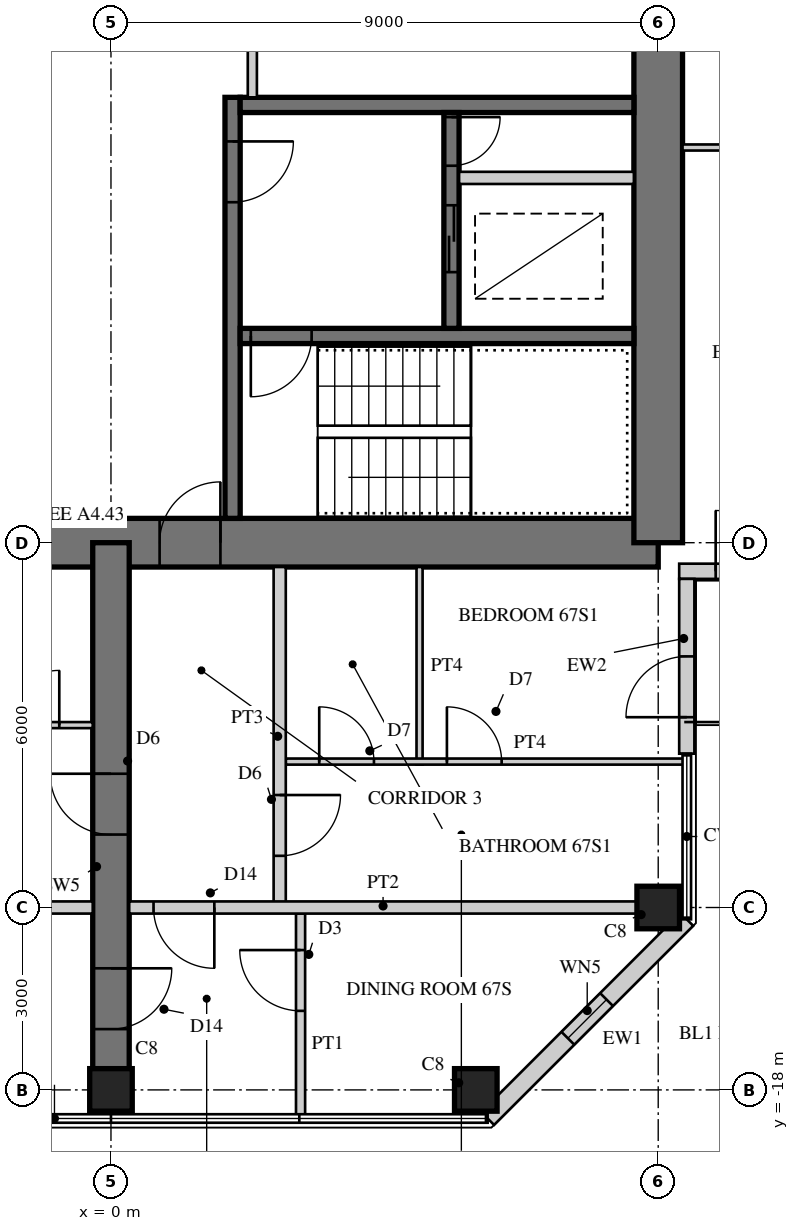
"""IFC4 building model, lengths in metres.
Left out: names, types, materials, properties, quantities, classifications, styles, units other than length and angle.
Written with IfcOpenShell. Run it as: python <this file> out.ifc"""

import sys

from ifc_helpers import new_model, si_unit, direction, frame, frame_2d, origin, origin_2d, place, context, subcontext, project, spatial, rectangle, hollow_rectangle, extrude, element, fill, save


model = new_model("IFC4")
c1 = context("Model", 3, precision=1e-05, world=origin(), true_north=direction((0.0, 1.0)))
c2 = subcontext(c1, "Body", "Model", "MODEL_VIEW")
j1 = project(units=[si_unit("LENGTHUNIT", "METRE"), si_unit("PLANEANGLEUNIT", "RADIAN")], contexts=[c1])
p1 = place(None, origin())
s1 = spatial("IfcSite", under=j1, at=p1, CompositionType="ELEMENT")
p2 = place(p1, origin())
s2 = spatial("IfcBuilding", under=s1, at=p2, CompositionType="ELEMENT")
p3 = place(p2, frame((0.0, 0.0, 261.1)))
s3 = spatial("IfcBuildingStorey", under=s2, at=p3, CompositionType="ELEMENT", Elevation=261.1)
p4 = place(p3, frame((-9.0, -9.0, 0.0), z_axis=(0.0, 0.0, 1.0), x_axis=(1.0, 0.0, 0.0)))
e1 = element("IfcWall", 1, at=p4, inside=s3, PredefinedType="SHEAR", context=c2, shape_type="SweptSolid", body=[
    extrude(rectangle(XDim=18.0, YDim=0.8, at=frame_2d((9.0, 0.0))), origin(), (0.0, 0.0, 1.0), 3.4),
])
p5 = place(p4, frame((9.8, 0.0, 0.0)))
e2 = element("IfcOpeningElement", 2, at=p5, cuts=e1, PredefinedType="OPENING", context=c2, shape_type="SweptSolid", body=[
    extrude(rectangle(XDim=1.0, YDim=2.4, at=frame_2d((0.5, 1.2))), frame((0.0, 0.41, 0.0), z_axis=(0.0, -1.0, 0.0), x_axis=(1.0, 0.0, 0.0)), (0.0, 0.0, 1.0), 0.82),
])
p6 = place(p3, frame((9.0, -9.0, 0.0), z_axis=(0.0, 0.0, 1.0), x_axis=(0.0, 1.0, 0.0)))
e3 = element("IfcWall", 3, at=p6, inside=s3, PredefinedType="SHEAR", context=c2, shape_type="SweptSolid", body=[
    extrude(rectangle(XDim=18.0, YDim=0.8, at=frame_2d((9.0, 0.0))), origin(), (0.0, 0.0, 1.0), 3.4),
])
p7 = place(p6, frame((9.8, 0.0, 0.0)))
e4 = element("IfcOpeningElement", 4, at=p7, cuts=e3, PredefinedType="OPENING", context=c2, shape_type="SweptSolid", body=[
    extrude(rectangle(XDim=1.0, YDim=2.4, at=frame_2d((0.5, 1.2))), frame((0.0, 0.41, 0.0), z_axis=(0.0, -1.0, 0.0), x_axis=(1.0, 0.0, 0.0)), (0.0, 0.0, 1.0), 0.82),
])
p8 = place(p3, frame((2.0, -1.675, 0.0), z_axis=(0.0, 0.0, 1.0), x_axis=(0.0, -1.0, 0.0)))
e5 = element("IfcWall", 5, at=p8, inside=s3, PredefinedType="SHEAR", context=c2, shape_type="SweptSolid", body=[
    extrude(rectangle(XDim=6.925, YDim=0.25, at=frame_2d((3.462, 0.0))), origin(), (0.0, 0.0, 1.0), 3.4),
])
p9 = place(p8, frame((0.725, 0.0, 0.0)))
e6 = element("IfcOpeningElement", 6, at=p9, cuts=e5, PredefinedType="OPENING", context=c2, shape_type="SweptSolid", body=[
    extrude(rectangle(XDim=1.0, YDim=2.1, at=frame_2d((0.5, 1.05))), frame((0.0, 0.135, 0.0), z_axis=(0.0, -1.0, 0.0), x_axis=(1.0, 0.0, 0.0)), (0.0, 0.0, 1.0), 0.27),
])
p10 = place(p3, frame((2.125, -1.8, 0.0), z_axis=(0.0, 0.0, 1.0), x_axis=(1.0, 0.0, 0.0)))
e7 = element("IfcWall", 7, at=p10, inside=s3, PredefinedType="SHEAR", context=c2, shape_type="SweptSolid", body=[
    extrude(rectangle(XDim=6.475, YDim=0.25, at=frame_2d((3.238, 0.0))), origin(), (0.0, 0.0, 1.0), 3.4),
])
p11 = place(p3, frame((2.125, -5.6, 0.0), z_axis=(0.0, 0.0, 1.0), x_axis=(1.0, 0.0, 0.0)))
e8 = element("IfcWall", 8, at=p11, inside=s3, PredefinedType="SHEAR", context=c2, shape_type="SweptSolid", body=[
    extrude(rectangle(XDim=6.475, YDim=0.25, at=frame_2d((3.238, 0.0))), origin(), (0.0, 0.0, 1.0), 3.4),
])
p12 = place(p11, frame((0.175, 0.0, 0.0)))
e9 = element("IfcOpeningElement", 9, at=p12, cuts=e8, PredefinedType="OPENING", context=c2, shape_type="SweptSolid", body=[
    extrude(rectangle(XDim=1.0, YDim=2.1, at=frame_2d((0.5, 1.05))), frame((0.0, 0.135, 0.0), z_axis=(0.0, -1.0, 0.0), x_axis=(1.0, 0.0, 0.0)), (0.0, 0.0, 1.0), 0.27),
])
p13 = place(p3, frame((5.6, -1.925, 0.0), z_axis=(0.0, 0.0, 1.0), x_axis=(0.0, -1.0, 0.0)))
e10 = element("IfcWall", 10, at=p13, inside=s3, PredefinedType="SHEAR", context=c2, shape_type="SweptSolid", body=[
    extrude(rectangle(XDim=3.55, YDim=0.25, at=frame_2d((1.775, 0.0))), origin(), (0.0, 0.0, 1.0), 3.4),
])
p14 = place(p13, frame((1.525, 0.0, 0.0)))
e11 = element("IfcOpeningElement", 11, at=p14, cuts=e10, PredefinedType="OPENING", context=c2, shape_type="SweptSolid", body=[
    extrude(rectangle(XDim=1.1, YDim=2.2, at=frame_2d((0.55, 1.1))), frame((0.0, 0.135, 0.0), z_axis=(0.0, -1.0, 0.0), x_axis=(1.0, 0.0, 0.0)), (0.0, 0.0, 1.0), 0.27),
])
p15 = place(p13, frame((0.075, 0.0, 0.0)))
e12 = element("IfcOpeningElement", 12, at=p15, cuts=e10, PredefinedType="OPENING", context=c2, shape_type="SweptSolid", body=[
    extrude(rectangle(XDim=0.8, YDim=2.1, at=frame_2d((0.4, 1.05))), frame((0.0, 0.135, 0.0), z_axis=(0.0, -1.0, 0.0), x_axis=(1.0, 0.0, 0.0)), (0.0, 0.0, 1.0), 0.27),
])
p16 = place(p3, frame((5.725, -3.0, 0.0), z_axis=(0.0, 0.0, 1.0), x_axis=(1.0, 0.0, 0.0)))
e13 = element("IfcWall", 13, at=p16, inside=s3, PredefinedType="PARTITIONING", context=c2, shape_type="SweptSolid", body=[
    extrude(rectangle(XDim=2.875, YDim=0.2, at=frame_2d((1.438, 0.0))), origin(), (0.0, 0.0, 1.0), 3.4),
])
p17 = place(p3, frame((0.0, -9.0, 0.0), z_axis=(0.0, 0.0, 1.0), x_axis=(0.0, -1.0, 0.0)))
e14 = element("IfcWall", 14, at=p17, inside=s3, PredefinedType="SHEAR", context=c2, shape_type="SweptSolid", body=[
    extrude(rectangle(XDim=9.0, YDim=0.6, at=frame_2d((4.5, 0.0))), origin(), (0.0, 0.0, 1.0), 3.4),
])
p18 = place(p17, frame((3.8, 0.0, 0.0)))
e15 = element("IfcOpeningElement", 15, at=p18, cuts=e14, PredefinedType="OPENING", context=c2, shape_type="SweptSolid", body=[
    extrude(rectangle(XDim=1.0, YDim=2.15, at=frame_2d((0.5, 1.075))), frame((0.0, 0.31, 0.0), z_axis=(0.0, -1.0, 0.0), x_axis=(1.0, 0.0, 0.0)), (0.0, 0.0, 1.0), 0.62),
])
p19 = place(p17, frame((7.0, 0.0, 0.0)))
e16 = element("IfcOpeningElement", 16, at=p19, cuts=e14, PredefinedType="OPENING", context=c2, shape_type="SweptSolid", body=[
    extrude(rectangle(XDim=1.0, YDim=2.2, at=frame_2d((0.5, 1.1))), frame((0.0, 0.31, 0.0), z_axis=(0.0, -1.0, 0.0), x_axis=(1.0, 0.0, 0.0)), (0.0, 0.0, 1.0), 0.62),
])
for number, where, z_axis, x_axis in (
    (17, (9.0, -15.0, 0.0), (0.0, 0.0, 1.0), (1.0, 0.0, 0.0)),
    (18, (0.0, -18.0, 0.0), (0.0, 0.0, 1.0), (1.0, 0.0, 0.0)),
    (19, (6.0, -18.0, 0.0), (0.0, 0.0, 1.0), (1.0, 0.0, 0.0)),
):
    element("IfcColumn", number, at=place(p3, frame(where, z_axis=z_axis, x_axis=x_axis)), inside=s3, PredefinedType="COLUMN", context=c2, shape_type="SweptSolid", body=[
        extrude(rectangle(XDim=0.7, YDim=0.7, at=origin_2d()), origin(), (0.0, 0.0, 1.0), 3.4),
    ])
p20 = place(p3, frame((9.345, -9.47, 0.0), z_axis=(0.0, 0.0, 1.0), x_axis=(1.0, 0.0, 0.0)))
e20 = element("IfcWall", 20, at=p20, inside=s3, PredefinedType="SOLIDWALL", context=c2, shape_type="SweptSolid", body=[
    extrude(rectangle(XDim=3.125, YDim=0.25, at=frame_2d((1.562, 0.0))), origin(), (0.0, 0.0, 1.0), 3.22),
])
p21 = place(p20, frame((0.6, 0.0, 0.0)))
e21 = element("IfcOpeningElement", 21, at=p21, cuts=e20, PredefinedType="OPENING", context=c2, shape_type="SweptSolid", body=[
    extrude(rectangle(XDim=1.0, YDim=2.2, at=frame_2d((0.5, 1.1))), frame((0.0, 0.135, 0.0), z_axis=(0.0, -1.0, 0.0), x_axis=(1.0, 0.0, 0.0)), (0.0, 0.0, 1.0), 0.27),
])
p22 = place(p3, frame((6.195, -18.47, 0.0), z_axis=(0.0, 0.0, 1.0), x_axis=(0.707106781187, 0.707106781187, 0.0)))
e22 = element("IfcWall", 22, at=p22, inside=s3, PredefinedType="SOLIDWALL", context=c2, shape_type="SweptSolid", body=[
    extrude(rectangle(XDim=4.632, YDim=0.3, at=frame_2d((2.316, 0.0))), origin(), (0.0, 0.0, 1.0), 3.22),
])
p23 = place(p22, frame((1.866, 0.0, 0.3)))
e23 = element("IfcOpeningElement", 23, at=p23, cuts=e22, PredefinedType="OPENING", context=c2, shape_type="SweptSolid", body=[
    extrude(rectangle(XDim=0.9, YDim=2.4, at=frame_2d((0.45, 1.2))), frame((0.0, 0.16, 0.0), z_axis=(0.0, -1.0, 0.0), x_axis=(1.0, 0.0, 0.0)), (0.0, 0.0, 1.0), 0.32),
])
p24 = place(p3, frame((9.47, -12.47, 0.0), z_axis=(0.0, 0.0, 1.0), x_axis=(0.0, 1.0, 0.0)))
e24 = element("IfcWall", 24, at=p24, inside=s3, PredefinedType="SOLIDWALL", context=c2, shape_type="SweptSolid", body=[
    extrude(rectangle(XDim=2.875, YDim=0.25, at=frame_2d((1.438, 0.0))), origin(), (0.0, 0.0, 1.0), 3.22),
])
p25 = place(p24, frame((0.6, 0.0, 0.0)))
e25 = element("IfcOpeningElement", 25, at=p25, cuts=e24, PredefinedType="OPENING", context=c2, shape_type="SweptSolid", body=[
    extrude(rectangle(XDim=1.0, YDim=2.2, at=frame_2d((0.5, 1.1))), frame((0.0, 0.135, 0.0), z_axis=(0.0, -1.0, 0.0), x_axis=(1.0, 0.0, 0.0)), (0.0, 0.0, 1.0), 0.27),
])
p26 = place(p3, frame((2.325, -1.675, 0.0), z_axis=(0.0, 0.0, 1.0), x_axis=(0.0, 1.0, 0.0)))
e26 = element("IfcWall", 26, at=p26, inside=s3, PredefinedType="PARTITIONING", context=c2, shape_type="SweptSolid", body=[
    extrude(rectangle(XDim=1.95, YDim=0.15, at=frame_2d((0.975, 0.0))), origin(), (0.0, 0.0, 1.0), 3.22),
])
p27 = place(p3, frame((9.4, -2.5, 0.0), z_axis=(0.0, 0.0, 1.0), x_axis=(1.0, 0.0, 0.0)))
e27 = element("IfcWall", 27, at=p27, inside=s3, PredefinedType="PARTITIONING", context=c2, shape_type="SweptSolid", body=[
    extrude(rectangle(XDim=2.65, YDim=0.1, at=frame_2d((1.325, 0.0))), origin(), (0.0, 0.0, 1.0), 3.22),
])
p28 = place(p3, frame((5.075, -9.4, 0.0), z_axis=(0.0, 0.0, 1.0), x_axis=(0.0, -1.0, 0.0)))
e28 = element("IfcWall", 28, at=p28, inside=s3, PredefinedType="PARTITIONING", context=c2, shape_type="SweptSolid", body=[
    extrude(rectangle(XDim=3.25, YDim=0.1, at=frame_2d((1.625, 0.0))), origin(), (0.0, 0.0, 1.0), 3.22),
])
p29 = place(p3, frame((2.875, -12.6, 0.0), z_axis=(0.0, 0.0, 1.0), x_axis=(1.0, 0.0, 0.0)))
e29 = element("IfcWall", 29, at=p29, inside=s3, PredefinedType="PARTITIONING", context=c2, shape_type="SweptSolid", body=[
    extrude(rectangle(XDim=6.555, YDim=0.1, at=frame_2d((3.277, 0.0))), origin(), (0.0, 0.0, 1.0), 3.22),
])
p30 = place(p29, frame((0.55, 0.0, 0.0)))
e30 = element("IfcOpeningElement", 30, at=p30, cuts=e29, PredefinedType="OPENING", context=c2, shape_type="SweptSolid", body=[
    extrude(rectangle(XDim=0.9, YDim=2.1, at=frame_2d((0.45, 1.05))), frame((0.0, 0.06, 0.0), z_axis=(0.0, -1.0, 0.0), x_axis=(1.0, 0.0, 0.0)), (0.0, 0.0, 1.0), 0.12),
])
p31 = place(p29, frame((2.65, 0.0, 0.0)))
e31 = element("IfcOpeningElement", 31, at=p31, cuts=e29, PredefinedType="OPENING", context=c2, shape_type="SweptSolid", body=[
    extrude(rectangle(XDim=0.9, YDim=2.1, at=frame_2d((0.45, 1.05))), frame((0.0, 0.06, 0.0), z_axis=(0.0, -1.0, 0.0), x_axis=(1.0, 0.0, 0.0)), (0.0, 0.0, 1.0), 0.12),
])
p32 = place(p3, frame((-9.345, -12.0, 0.0), z_axis=(0.0, 0.0, 1.0), x_axis=(1.0, 0.0, 0.0)))
e32 = element("IfcWall", 32, at=p32, inside=s3, PredefinedType="PARTITIONING", context=c2, shape_type="SweptSolid", body=[
    extrude(rectangle(XDim=9.045, YDim=0.1, at=frame_2d((4.522, 0.0))), origin(), (0.0, 0.0, 1.0), 3.22),
])
p33 = place(p32, frame((5.495, 0.0, 0.0)))
e33 = element("IfcOpeningElement", 33, at=p33, cuts=e32, PredefinedType="OPENING", context=c2, shape_type="SweptSolid", body=[
    extrude(rectangle(XDim=0.9, YDim=2.1, at=frame_2d((0.45, 1.05))), frame((0.0, 0.06, 0.0), z_axis=(0.0, -1.0, 0.0), x_axis=(1.0, 0.0, 0.0)), (0.0, 0.0, 1.0), 0.12),
])
p34 = place(p32, frame((7.595, 0.0, 0.0)))
e34 = element("IfcOpeningElement", 34, at=p34, cuts=e32, PredefinedType="OPENING", context=c2, shape_type="SweptSolid", body=[
    extrude(rectangle(XDim=0.9, YDim=2.1, at=frame_2d((0.45, 1.05))), frame((0.0, 0.06, 0.0), z_axis=(0.0, -1.0, 0.0), x_axis=(1.0, 0.0, 0.0)), (0.0, 0.0, 1.0), 0.12),
])
p35 = place(p3, frame((2.775, -9.4, 0.0), z_axis=(0.0, 0.0, 1.0), x_axis=(0.0, -1.0, 0.0)))
e35 = element("IfcWall", 35, at=p35, inside=s3, PredefinedType="SOLIDWALL", context=c2, shape_type="SweptSolid", body=[
    extrude(rectangle(XDim=5.6, YDim=0.2, at=frame_2d((2.8, 0.0))), origin(), (0.0, 0.0, 1.0), 3.22),
])
p36 = place(p35, frame((3.75, 0.0, 0.0)))
e36 = element("IfcOpeningElement", 36, at=p36, cuts=e35, PredefinedType="OPENING", context=c2, shape_type="SweptSolid", body=[
    extrude(rectangle(XDim=1.0, YDim=2.15, at=frame_2d((0.5, 1.075))), frame((0.0, 0.11, 0.0), z_axis=(0.0, -1.0, 0.0), x_axis=(1.0, 0.0, 0.0)), (0.0, 0.0, 1.0), 0.22),
])
p37 = place(p3, frame((3.118, -15.1, 0.0), z_axis=(0.0, 0.0, 1.0), x_axis=(0.0, -1.0, 0.0)))
e37 = element("IfcWall", 37, at=p37, inside=s3, PredefinedType="PARTITIONING", context=c2, shape_type="SweptSolid", body=[
    extrude(rectangle(XDim=3.33, YDim=0.15, at=frame_2d((1.665, 0.0))), origin(), (0.0, 0.0, 1.0), 3.22),
])
p38 = place(p37, frame((0.6, 0.0, 0.0)))
e38 = element("IfcOpeningElement", 38, at=p38, cuts=e37, PredefinedType="OPENING", context=c2, shape_type="SweptSolid", body=[
    extrude(rectangle(XDim=1.0, YDim=2.1, at=frame_2d((0.5, 1.05))), frame((0.0, 0.085, 0.0), z_axis=(0.0, -1.0, 0.0), x_axis=(1.0, 0.0, 0.0)), (0.0, 0.0, 1.0), 0.17),
])
p39 = place(p3, frame((-8.65, -15.0, 0.0), z_axis=(0.0, 0.0, 1.0), x_axis=(1.0, 0.0, 0.0)))
e39 = element("IfcWall", 39, at=p39, inside=s3, PredefinedType="SOLIDWALL", context=c2, shape_type="SweptSolid", body=[
    extrude(rectangle(XDim=8.35, YDim=0.2, at=frame_2d((4.175, 0.0))), origin(), (0.0, 0.0, 1.0), 2.52),
])
p40 = place(p3, frame((0.3, -15.0, 0.0), z_axis=(0.0, 0.0, 1.0), x_axis=(1.0, 0.0, 0.0)))
e40 = element("IfcWall", 40, at=p40, inside=s3, PredefinedType="SOLIDWALL", context=c2, shape_type="SweptSolid", body=[
    extrude(rectangle(XDim=8.35, YDim=0.2, at=frame_2d((4.175, 0.0))), origin(), (0.0, 0.0, 1.0), 2.52),
])
p41 = place(p40, frame((0.4, 0.0, 0.0)))
e41 = element("IfcOpeningElement", 41, at=p41, cuts=e40, PredefinedType="OPENING", context=c2, shape_type="SweptSolid", body=[
    extrude(rectangle(XDim=1.0, YDim=2.2, at=frame_2d((0.5, 1.1))), frame((0.0, 0.11, 0.0), z_axis=(0.0, -1.0, 0.0), x_axis=(1.0, 0.0, 0.0)), (0.0, 0.0, 1.0), 0.22),
])
p42 = place(p21, origin())
e42 = element("IfcDoor", 42, at=p42, inside=s3, OperationType="SINGLE_SWING_LEFT", PredefinedType="DOOR", context=c2, shape_type="SweptSolid", body=[
    extrude(hollow_rectangle(XDim=1.0, YDim=2.2, WallThickness=0.06, at=frame_2d((0.5, 1.1))), frame((0.0, 0.025, 0.0), z_axis=(0.0, -1.0, 0.0), x_axis=(1.0, 0.0, 0.0)), (0.0, 0.0, 1.0), 0.05),
    extrude(rectangle(XDim=0.879, YDim=2.079, at=frame_2d((0.5, 1.1))), frame((0.0, 0.025, 0.0), z_axis=(0.0, -1.0, 0.0), x_axis=(1.0, 0.0, 0.0)), (0.0, 0.0, 1.0), 0.05),
])
fill(e21, e42)
p43 = place(p23, origin())
e43 = element("IfcWindow", 43, at=p43, inside=s3, PartitioningType="SINGLE_PANEL", PredefinedType="WINDOW", context=c2, shape_type="SweptSolid", body=[
    extrude(hollow_rectangle(XDim=0.9, YDim=2.4, WallThickness=0.06, at=frame_2d((0.45, 1.2))), frame((0.0, 0.03, 0.0), z_axis=(0.0, -1.0, 0.0), x_axis=(1.0, 0.0, 0.0)), (0.0, 0.0, 1.0), 0.06),
    extrude(rectangle(XDim=0.779, YDim=2.279, at=frame_2d((0.45, 1.2))), frame((0.0, 0.03, 0.0), z_axis=(0.0, -1.0, 0.0), x_axis=(1.0, 0.0, 0.0)), (0.0, 0.0, 1.0), 0.06),
])
fill(e23, e43)
p44 = place(p25, origin())
e44 = element("IfcDoor", 44, at=p44, inside=s3, OperationType="SINGLE_SWING_LEFT", PredefinedType="DOOR", context=c2, shape_type="SweptSolid", body=[
    extrude(hollow_rectangle(XDim=1.0, YDim=2.2, WallThickness=0.06, at=frame_2d((0.5, 1.1))), frame((0.0, 0.025, 0.0), z_axis=(0.0, -1.0, 0.0), x_axis=(1.0, 0.0, 0.0)), (0.0, 0.0, 1.0), 0.05),
    extrude(rectangle(XDim=0.879, YDim=2.079, at=frame_2d((0.5, 1.1))), frame((0.0, 0.025, 0.0), z_axis=(0.0, -1.0, 0.0), x_axis=(1.0, 0.0, 0.0)), (0.0, 0.0, 1.0), 0.05),
])
fill(e25, e44)
p45 = place(p30, origin())
e45 = element("IfcDoor", 45, at=p45, inside=s3, OperationType="SINGLE_SWING_LEFT", PredefinedType="DOOR", context=c2, shape_type="SweptSolid", body=[
    extrude(rectangle(XDim=0.9, YDim=2.1, at=frame_2d((0.45, 1.05))), frame((0.0, 0.025, 0.0), z_axis=(0.0, -1.0, 0.0), x_axis=(1.0, 0.0, 0.0)), (0.0, 0.0, 1.0), 0.05),
])
fill(e30, e45)
p46 = place(p31, origin())
e46 = element("IfcDoor", 46, at=p46, inside=s3, OperationType="SINGLE_SWING_LEFT", PredefinedType="DOOR", context=c2, shape_type="SweptSolid", body=[
    extrude(rectangle(XDim=0.9, YDim=2.1, at=frame_2d((0.45, 1.05))), frame((0.0, 0.025, 0.0), z_axis=(0.0, -1.0, 0.0), x_axis=(1.0, 0.0, 0.0)), (0.0, 0.0, 1.0), 0.05),
])
fill(e31, e46)
p47 = place(p34, origin())
e47 = element("IfcDoor", 47, at=p47, inside=s3, OperationType="SINGLE_SWING_RIGHT", PredefinedType="DOOR", context=c2, shape_type="SweptSolid", body=[
    extrude(rectangle(XDim=0.9, YDim=2.1, at=frame_2d((0.45, 1.05))), frame((0.0, 0.025, 0.0), z_axis=(0.0, -1.0, 0.0), x_axis=(1.0, 0.0, 0.0)), (0.0, 0.0, 1.0), 0.05),
])
fill(e34, e47)
p48 = place(p36, origin())
e48 = element("IfcDoor", 48, at=p48, inside=s3, OperationType="SINGLE_SWING_LEFT", PredefinedType="DOOR", context=c2, shape_type="SweptSolid", body=[
    extrude(rectangle(XDim=1.0, YDim=2.15, at=frame_2d((0.5, 1.075))), frame((0.0, 0.025, 0.0), z_axis=(0.0, -1.0, 0.0), x_axis=(1.0, 0.0, 0.0)), (0.0, 0.0, 1.0), 0.05),
])
fill(e36, e48)
p49 = place(p38, frame((1.0, 0.0, 0.0), z_axis=(0.0, 0.0, 1.0), x_axis=(-1.0, 0.0, 0.0)))
e49 = element("IfcDoor", 49, at=p49, inside=s3, OperationType="SINGLE_SWING_RIGHT", PredefinedType="DOOR", context=c2, shape_type="SweptSolid", body=[
    extrude(rectangle(XDim=1.0, YDim=2.1, at=frame_2d((0.5, 1.05))), frame((0.0, 0.025, 0.0), z_axis=(0.0, -1.0, 0.0), x_axis=(1.0, 0.0, 0.0)), (0.0, 0.0, 1.0), 0.05),
])
fill(e38, e49)
p50 = place(p41, frame((1.0, 0.0, 0.0), z_axis=(0.0, 0.0, 1.0), x_axis=(-1.0, 0.0, 0.0)))
e50 = element("IfcDoor", 50, at=p50, inside=s3, OperationType="SINGLE_SWING_LEFT", PredefinedType="DOOR", context=c2, shape_type="SweptSolid", body=[
    extrude(rectangle(XDim=1.0, YDim=2.2, at=frame_2d((0.5, 1.1))), frame((0.0, 0.025, 0.0), z_axis=(0.0, -1.0, 0.0), x_axis=(1.0, 0.0, 0.0)), (0.0, 0.0, 1.0), 0.05),
])
fill(e41, e50)
p51 = place(p18, frame((1.0, 0.0, 0.0), z_axis=(0.0, 0.0, 1.0), x_axis=(-1.0, 0.0, 0.0)))
e51 = element("IfcDoor", 51, at=p51, inside=s3, OperationType="SINGLE_SWING_RIGHT", PredefinedType="DOOR", context=c2, shape_type="SweptSolid", body=[
    extrude(rectangle(XDim=1.0, YDim=2.15, at=frame_2d((0.5, 1.075))), frame((0.0, 0.025, 0.0), z_axis=(0.0, -1.0, 0.0), x_axis=(1.0, 0.0, 0.0)), (0.0, 0.0, 1.0), 0.05),
])
fill(e15, e51)
p52 = place(p19, origin())
e52 = element("IfcDoor", 52, at=p52, inside=s3, OperationType="SINGLE_SWING_LEFT", PredefinedType="DOOR", context=c2, shape_type="SweptSolid", body=[
    extrude(rectangle(XDim=1.0, YDim=2.2, at=frame_2d((0.5, 1.1))), frame((0.0, 0.025, 0.0), z_axis=(0.0, -1.0, 0.0), x_axis=(1.0, 0.0, 0.0)), (0.0, 0.0, 1.0), 0.05),
])
fill(e16, e52)
p53 = place(p5, origin())
e53 = element("IfcDoor", 53, at=p53, inside=s3, OperationType="SINGLE_SWING_RIGHT", PredefinedType="DOOR", context=c2, shape_type="SweptSolid", body=[
    extrude(rectangle(XDim=1.0, YDim=2.4, at=frame_2d((0.5, 1.2))), frame((0.0, 0.055, 0.0), z_axis=(0.0, -1.0, 0.0), x_axis=(1.0, 0.0, 0.0)), (0.0, 0.0, 1.0), 0.05),
])
fill(e2, e53)
p54 = place(p9, origin())
e54 = element("IfcDoor", 54, at=p54, inside=s3, OperationType="SINGLE_SWING_LEFT", PredefinedType="DOOR", context=c2, shape_type="SweptSolid", body=[
    extrude(rectangle(XDim=1.0, YDim=2.1, at=frame_2d((0.5, 1.05))), frame((0.0, 0.025, 0.0), z_axis=(0.0, -1.0, 0.0), x_axis=(1.0, 0.0, 0.0)), (0.0, 0.0, 1.0), 0.05),
])
fill(e6, e54)
p55 = place(p12, frame((1.0, 0.0, 0.0), z_axis=(0.0, 0.0, 1.0), x_axis=(-1.0, 0.0, 0.0)))
e55 = element("IfcDoor", 55, at=p55, inside=s3, OperationType="SINGLE_SWING_RIGHT", PredefinedType="DOOR", context=c2, shape_type="SweptSolid", body=[
    extrude(rectangle(XDim=1.0, YDim=2.1, at=frame_2d((0.5, 1.05))), frame((0.0, 0.025, 0.0), z_axis=(0.0, -1.0, 0.0), x_axis=(1.0, 0.0, 0.0)), (0.0, 0.0, 1.0), 0.05),
])
fill(e9, e55)
p56 = place(p14, origin())
e56 = element("IfcDoor", 56, at=p56, inside=s3, OperationType="DOUBLE_DOOR_SLIDING", PredefinedType="DOOR", context=c2, shape_type="SweptSolid", body=[
    extrude(rectangle(XDim=1.1, YDim=2.2, at=frame_2d((0.55, 1.1))), frame((0.0, 0.025, 0.0), z_axis=(0.0, -1.0, 0.0), x_axis=(1.0, 0.0, 0.0)), (0.0, 0.0, 1.0), 0.05),
])
fill(e11, e56)
p57 = place(p15, origin())
e57 = element("IfcDoor", 57, at=p57, inside=s3, OperationType="SINGLE_SWING_LEFT", PredefinedType="DOOR", context=c2, shape_type="SweptSolid", body=[
    extrude(rectangle(XDim=0.8, YDim=2.1, at=frame_2d((0.4, 1.05))), frame((0.0, 0.025, 0.0), z_axis=(0.0, -1.0, 0.0), x_axis=(1.0, 0.0, 0.0)), (0.0, 0.0, 1.0), 0.05),
])
fill(e12, e57)
save(model, sys.argv[1])
